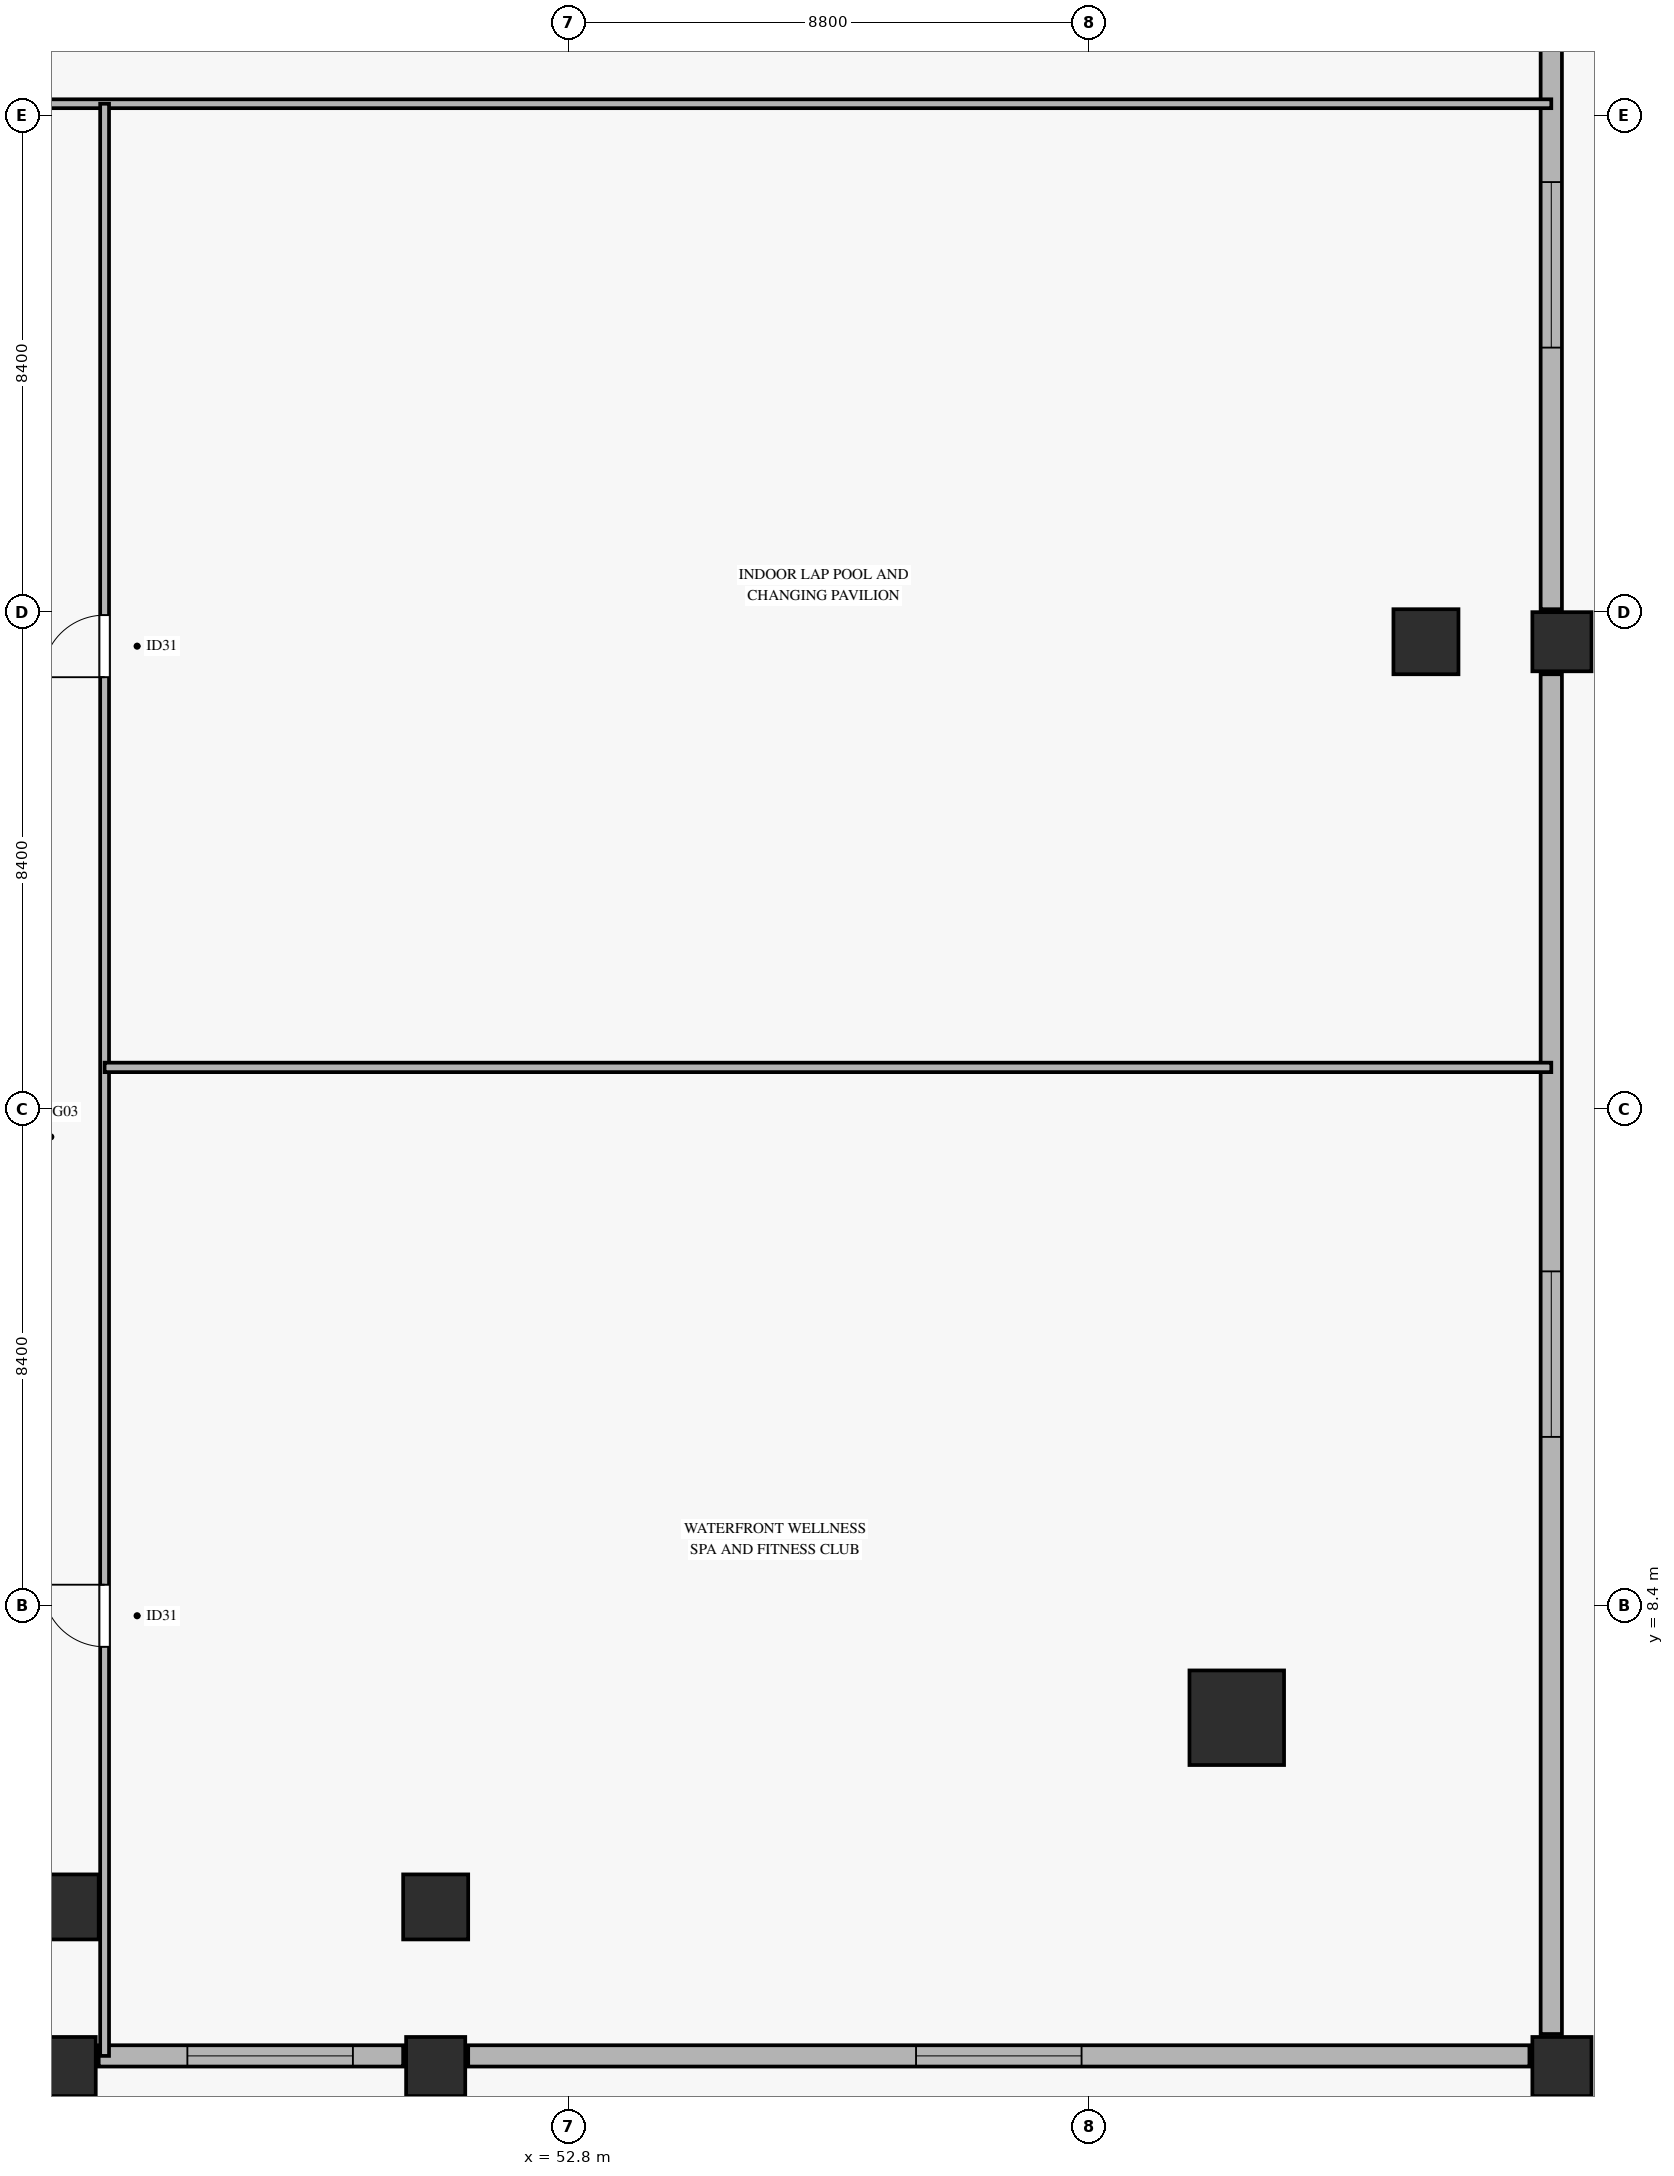
"""IFC4 building model, lengths in metres.
Left out: names, types, materials, properties, quantities, classifications, styles, units other than length and angle.
Written with IfcOpenShell. Run it as: python <this file> out.ifc"""

import sys

from ifc_helpers import new_model, si_unit, direction, frame, frame_2d, origin, origin_2d, place, context, subcontext, project, spatial, rectangle, hollow_rectangle, extrude, source, transform, mapped, element, fill, save


model = new_model("IFC4")
c1 = context("Model", 3, precision=1e-05, world=origin(), true_north=direction((0.0, 1.0)))
c2 = subcontext(c1, "Body", "Model", "MODEL_VIEW")
j1 = project(units=[si_unit("LENGTHUNIT", "METRE"), si_unit("PLANEANGLEUNIT", "RADIAN")], contexts=[c1])
p1 = place(None, origin())
s1 = spatial("IfcSite", under=j1, at=p1, CompositionType="ELEMENT")
p2 = place(p1, origin())
s2 = spatial("IfcBuilding", under=s1, at=p2, CompositionType="ELEMENT")
p3 = place(p2, frame((0.0, 0.0, 15.2)))
s3 = spatial("IfcBuildingStorey", under=s2, at=p3, CompositionType="ELEMENT", Elevation=15.2)
m1 = source(origin(), c2, "Body", "SweptSolid", [
    extrude(hollow_rectangle(XDim=1.6, YDim=1.6, WallThickness=0.075, at=origin_2d()), origin(), (0.0, 0.0, 1.0), 4.65),
])
p4 = place(p3, frame((64.1, 6.5, 0.0), z_axis=(0.0, 0.0, 1.0), x_axis=(1.0, 0.0, 0.0)))
e1 = element("IfcColumn", 1, at=p4, inside=s3, PredefinedType="COLUMN", context=c2, shape_type="MappedRepresentation", body=[
    mapped(m1, transform((0.0, 0.0, 0.0), x_axis=(1.0, 0.0, 0.0), y_axis=(0.0, 1.0, 0.0), z_axis=(0.0, 0.0, 1.0), scale=1.0)),
])
m2 = source(origin(), c2, "Body", "SweptSolid", [
    extrude(hollow_rectangle(XDim=1.1, YDim=1.1, WallThickness=0.05, at=origin_2d()), origin(), (0.0, 0.0, 1.0), 4.65),
])
for number, where, z_axis, x_axis in (
    (2, (44.3, 3.3, 0.0), (0.0, 0.0, 1.0), (1.0, 0.0, 0.0)),
    (3, (50.55, 3.3, 0.0), (0.0, 0.0, 1.0), (1.0, 0.0, 0.0)),
    (4, (67.3, 24.7, 0.0), (0.0, 0.0, 1.0), (1.0, 0.0, 0.0)),
):
    element("IfcColumn", number, at=place(p3, frame(where, z_axis=z_axis, x_axis=x_axis)), inside=s3, PredefinedType="COLUMN", context=c2, shape_type="MappedRepresentation", body=[
        mapped(m2, transform((0.0, 0.0, 0.0), x_axis=(1.0, 0.0, 0.0), y_axis=(0.0, 1.0, 0.0), z_axis=(0.0, 0.0, 1.0), scale=1.0)),
    ])
m3 = source(origin(), c2, "Body", "SweptSolid", [
    extrude(hollow_rectangle(XDim=1.0, YDim=1.0, WallThickness=0.045, at=origin_2d()), origin(), (0.0, 0.0, 1.0), 4.65),
])
for number, where, z_axis, x_axis in (
    (5, (44.3, 0.6, 0.0), (0.0, 0.0, 1.0), (1.0, 0.0, 0.0)),
    (6, (50.55, 0.6, 0.0), (0.0, 0.0, 1.0), (1.0, 0.0, 0.0)),
    (7, (69.6, 0.6, 0.0), (0.0, 0.0, 1.0), (1.0, 0.0, 0.0)),
    (8, (69.6, 24.7, 0.0), (0.0, 0.0, 1.0), (1.0, 0.0, 0.0)),
):
    element("IfcColumn", number, at=place(p3, frame(where, z_axis=z_axis, x_axis=x_axis)), inside=s3, PredefinedType="COLUMN", context=c2, shape_type="MappedRepresentation", body=[
        mapped(m3, transform((0.0, 0.0, 0.0), x_axis=(1.0, 0.0, 0.0), y_axis=(0.0, 1.0, 0.0), z_axis=(0.0, 0.0, 1.0), scale=1.0)),
    ])
p5 = place(p3, frame((44.85, 0.78, 0.0), z_axis=(0.0, 0.0, 1.0), x_axis=(1.0, 0.0, 0.0)))
e9 = element("IfcWall", 9, at=p5, inside=s3, PredefinedType="SOLIDWALL", context=c2, shape_type="SweptSolid", body=[
    extrude(rectangle(XDim=5.15, YDim=0.36, at=frame_2d((2.575, 0.0))), origin(), (0.0, 0.0, 1.0), 3.53),
])
p6 = place(p5, frame((1.5, 0.0, 0.72)))
e10 = element("IfcOpeningElement", 10, at=p6, cuts=e9, PredefinedType="OPENING", context=c2, shape_type="SweptSolid", body=[
    extrude(rectangle(XDim=2.8, YDim=2.0, at=frame_2d((1.4, 1.0))), frame((0.0, 0.19, 0.0), z_axis=(0.0, -1.0, 0.0), x_axis=(1.0, 0.0, 0.0)), (0.0, 0.0, 1.0), 0.38),
])
p7 = place(p3, frame((51.1, 0.78, 0.0), z_axis=(0.0, 0.0, 1.0), x_axis=(1.0, 0.0, 0.0)))
e11 = element("IfcWall", 11, at=p7, inside=s3, PredefinedType="SOLIDWALL", context=c2, shape_type="SweptSolid", body=[
    extrude(rectangle(XDim=17.95, YDim=0.36, at=frame_2d((8.975, 0.0))), origin(), (0.0, 0.0, 1.0), 3.53),
])
p8 = place(p7, frame((7.575, 0.0, 0.72)))
e12 = element("IfcOpeningElement", 12, at=p8, cuts=e11, PredefinedType="OPENING", context=c2, shape_type="SweptSolid", body=[
    extrude(rectangle(XDim=2.8, YDim=2.0, at=frame_2d((1.4, 1.0))), frame((0.0, 0.19, 0.0), z_axis=(0.0, -1.0, 0.0), x_axis=(1.0, 0.0, 0.0)), (0.0, 0.0, 1.0), 0.38),
])
p9 = place(p3, frame((69.42, 1.15, 0.0), z_axis=(0.0, 0.0, 1.0), x_axis=(0.0, 1.0, 0.0)))
e13 = element("IfcWall", 13, at=p9, inside=s3, PredefinedType="SOLIDWALL", context=c2, shape_type="SweptSolid", body=[
    extrude(rectangle(XDim=23.0, YDim=0.36, at=frame_2d((11.5, 0.0))), origin(), (0.0, 0.0, 1.0), 3.53),
])
p10 = place(p9, frame((10.1, 0.0, 0.72)))
e14 = element("IfcOpeningElement", 14, at=p10, cuts=e13, PredefinedType="OPENING", context=c2, shape_type="SweptSolid", body=[
    extrude(rectangle(XDim=2.8, YDim=2.0, at=frame_2d((1.4, 1.0))), frame((0.0, 0.19, 0.0), z_axis=(0.0, -1.0, 0.0), x_axis=(1.0, 0.0, 0.0)), (0.0, 0.0, 1.0), 0.38),
])
p11 = place(p3, frame((69.42, 25.25, 0.0), z_axis=(0.0, 0.0, 1.0), x_axis=(0.0, 1.0, 0.0)))
e15 = element("IfcWall", 15, at=p11, inside=s3, PredefinedType="SOLIDWALL", context=c2, shape_type="SweptSolid", body=[
    extrude(rectangle(XDim=11.65, YDim=0.36, at=frame_2d((5.825, 0.0))), origin(), (0.0, 0.0, 1.0), 3.53),
])
p12 = place(p11, frame((4.425, 0.0, 0.72)))
e16 = element("IfcOpeningElement", 16, at=p12, cuts=e15, PredefinedType="OPENING", context=c2, shape_type="SweptSolid", body=[
    extrude(rectangle(XDim=2.8, YDim=2.0, at=frame_2d((1.4, 1.0))), frame((0.0, 0.19, 0.0), z_axis=(0.0, -1.0, 0.0), x_axis=(1.0, 0.0, 0.0)), (0.0, 0.0, 1.0), 0.38),
])
p13 = place(p3, frame((0.98, 33.8, 0.0), z_axis=(0.0, 0.0, 1.0), x_axis=(1.0, 0.0, 0.0)))
e17 = element("IfcWall", 17, at=p13, inside=s3, PredefinedType="PARTITIONING", context=c2, shape_type="SweptSolid", body=[
    extrude(rectangle(XDim=68.44, YDim=0.15, at=frame_2d((34.22, 0.0))), origin(), (0.0, 0.0, 1.0), 3.535),
])
p14 = place(p13, frame((25.27, 0.0, 0.0)))
e18 = element("IfcOpeningElement", 18, at=p14, cuts=e17, PredefinedType="OPENING", context=c2, shape_type="SweptSolid", body=[
    extrude(rectangle(XDim=1.05, YDim=2.15, at=frame_2d((0.525, 1.075))), frame((0.0, 0.085, 0.0), z_axis=(0.0, -1.0, 0.0), x_axis=(1.0, 0.0, 0.0)), (0.0, 0.0, 1.0), 0.17),
])
p15 = place(p13, frame((38.22, 0.0, 0.0)))
e19 = element("IfcOpeningElement", 19, at=p15, cuts=e17, PredefinedType="OPENING", context=c2, shape_type="SweptSolid", body=[
    extrude(rectangle(XDim=1.05, YDim=2.15, at=frame_2d((0.525, 1.075))), frame((0.0, 0.085, 0.0), z_axis=(0.0, -1.0, 0.0), x_axis=(1.0, 0.0, 0.0)), (0.0, 0.0, 1.0), 0.17),
])
p16 = place(p3, frame((44.95, 0.78, 0.0), z_axis=(0.0, 0.0, 1.0), x_axis=(0.0, 1.0, 0.0)))
e20 = element("IfcWall", 20, at=p16, inside=s3, PredefinedType="PARTITIONING", context=c2, shape_type="SweptSolid", body=[
    extrude(rectangle(XDim=33.02, YDim=0.15, at=frame_2d((16.51, 0.0))), origin(), (0.0, 0.0, 1.0), 3.535),
])
p17 = place(p16, frame((6.92, 0.0, 0.0)))
e21 = element("IfcOpeningElement", 21, at=p17, cuts=e20, PredefinedType="OPENING", context=c2, shape_type="SweptSolid", body=[
    extrude(rectangle(XDim=1.05, YDim=2.15, at=frame_2d((0.525, 1.075))), frame((0.0, 0.085, 0.0), z_axis=(0.0, -1.0, 0.0), x_axis=(1.0, 0.0, 0.0)), (0.0, 0.0, 1.0), 0.17),
])
p18 = place(p16, frame((23.32, 0.0, 0.0)))
e22 = element("IfcOpeningElement", 22, at=p18, cuts=e20, PredefinedType="OPENING", context=c2, shape_type="SweptSolid", body=[
    extrude(rectangle(XDim=1.05, YDim=2.15, at=frame_2d((0.525, 1.075))), frame((0.0, 0.085, 0.0), z_axis=(0.0, -1.0, 0.0), x_axis=(1.0, 0.0, 0.0)), (0.0, 0.0, 1.0), 0.17),
])
p19 = place(p3, frame((44.95, 17.5, 0.0), z_axis=(0.0, 0.0, 1.0), x_axis=(1.0, 0.0, 0.0)))
e23 = element("IfcWall", 23, at=p19, inside=s3, PredefinedType="PARTITIONING", context=c2, shape_type="SweptSolid", body=[
    extrude(rectangle(XDim=24.47, YDim=0.16, at=frame_2d((12.235, 0.0))), origin(), (0.0, 0.0, 1.0), 3.535),
])
m4 = source(origin(), c2, "Body", "SweptSolid", [
    extrude(rectangle(XDim=2.8, YDim=2.0, at=frame_2d((1.4, 1.0))), frame((0.0, 0.03, 0.0), z_axis=(0.0, -1.0, 0.0), x_axis=(1.0, 0.0, 0.0)), (0.0, 0.0, 1.0), 0.06),
])
p20 = place(p6, origin())
e24 = element("IfcWindow", 24, at=p20, inside=s3, PartitioningType="SINGLE_PANEL", PredefinedType="WINDOW", context=c2, shape_type="MappedRepresentation", body=[
    mapped(m4, transform((0.0, 0.0, 0.0), x_axis=(1.0, 0.0, 0.0), y_axis=(0.0, 1.0, 0.0), z_axis=(0.0, 0.0, 1.0), scale=1.0)),
])
fill(e10, e24)
p21 = place(p8, origin())
e25 = element("IfcWindow", 25, at=p21, inside=s3, PartitioningType="SINGLE_PANEL", PredefinedType="WINDOW", context=c2, shape_type="MappedRepresentation", body=[
    mapped(m4, transform((0.0, 0.0, 0.0), x_axis=(1.0, 0.0, 0.0), y_axis=(0.0, 1.0, 0.0), z_axis=(0.0, 0.0, 1.0), scale=1.0)),
])
fill(e12, e25)
p22 = place(p10, origin())
e26 = element("IfcWindow", 26, at=p22, inside=s3, PartitioningType="SINGLE_PANEL", PredefinedType="WINDOW", context=c2, shape_type="MappedRepresentation", body=[
    mapped(m4, transform((0.0, 0.0, 0.0), x_axis=(1.0, 0.0, 0.0), y_axis=(0.0, 1.0, 0.0), z_axis=(0.0, 0.0, 1.0), scale=1.0)),
])
fill(e14, e26)
p23 = place(p12, origin())
e27 = element("IfcWindow", 27, at=p23, inside=s3, PartitioningType="SINGLE_PANEL", PredefinedType="WINDOW", context=c2, shape_type="MappedRepresentation", body=[
    mapped(m4, transform((0.0, 0.0, 0.0), x_axis=(1.0, 0.0, 0.0), y_axis=(0.0, 1.0, 0.0), z_axis=(0.0, 0.0, 1.0), scale=1.0)),
])
fill(e16, e27)
m5 = source(origin(), c2, "Body", "SweptSolid", [
    extrude(rectangle(XDim=1.05, YDim=2.15, at=frame_2d((0.525, 1.075))), frame((0.0, 0.025, 0.0), z_axis=(0.0, -1.0, 0.0), x_axis=(1.0, 0.0, 0.0)), (0.0, 0.0, 1.0), 0.05),
])
p24 = place(p17, origin())
e28 = element("IfcDoor", 28, at=p24, inside=s3, OperationType="SINGLE_SWING_RIGHT", PredefinedType="DOOR", context=c2, shape_type="MappedRepresentation", body=[
    mapped(m5, transform((0.0, 0.0, 0.0), x_axis=(1.0, 0.0, 0.0), y_axis=(0.0, 1.0, 0.0), z_axis=(0.0, 0.0, 1.0), scale=1.0)),
])
fill(e21, e28)
p25 = place(p18, origin())
e29 = element("IfcDoor", 29, at=p25, inside=s3, OperationType="SINGLE_SWING_LEFT", PredefinedType="DOOR", context=c2, shape_type="MappedRepresentation", body=[
    mapped(m5, transform((0.0, 0.0, 0.0), x_axis=(1.0, 0.0, 0.0), y_axis=(0.0, 1.0, 0.0), z_axis=(0.0, 0.0, 1.0), scale=1.0)),
])
fill(e22, e29)
save(model, sys.argv[1])
